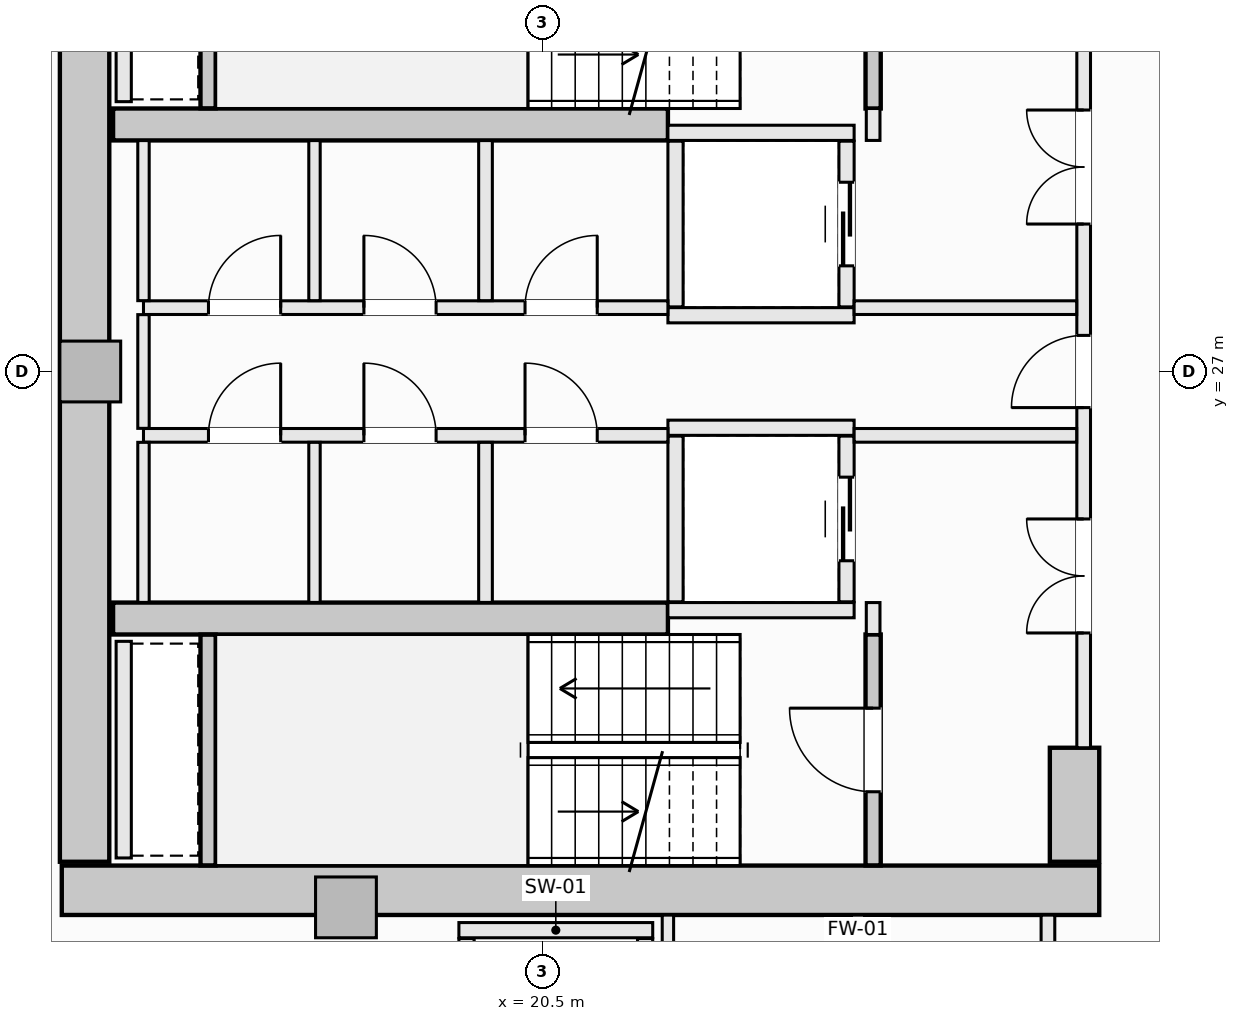
"""IFC4 building model, lengths in metres.
Left out: names, types, materials, properties, quantities, classifications, styles, units other than length and angle.
Written with IfcOpenShell. Run it as: python <this file> out.ifc"""

import sys

from ifc_helpers import new_model, si_unit, direction, frame, frame_2d, origin, origin_2d, place, context, subcontext, project, spatial, rectangle, extrude, element, fill, save


model = new_model("IFC4")
c1 = context("Model", 3, precision=1e-05, world=origin(), true_north=direction((0.0, 1.0)))
c2 = subcontext(c1, "Body", "Model", "MODEL_VIEW")
j1 = project(units=[si_unit("LENGTHUNIT", "METRE"), si_unit("PLANEANGLEUNIT", "RADIAN")], contexts=[c1])
p1 = place(None, origin())
s1 = spatial("IfcSite", under=j1, at=p1, CompositionType="ELEMENT")
p2 = place(p1, origin())
s2 = spatial("IfcBuilding", under=s1, at=p2, CompositionType="ELEMENT")
p3 = place(p2, frame((0.0, 0.0, 169.9)))
s3 = spatial("IfcBuildingStorey", under=s2, at=p3, CompositionType="ELEMENT", Elevation=169.9)
p4 = place(p3, frame((14.175, 20.175, -0.27), z_axis=(0.0, 0.0, 1.0), x_axis=(1.0, 0.0, 0.0)))
e1 = element("IfcWall", 1, at=p4, inside=s3, PredefinedType="SHEAR", context=c2, shape_type="SweptSolid", body=[
    extrude(rectangle(XDim=13.65, YDim=0.65, at=frame_2d((6.825, 0.0))), origin(), (0.0, 0.0, 1.0), 3.4),
])
p5 = place(p3, frame((14.475, 20.55, -0.27), z_axis=(0.0, 0.0, 1.0), x_axis=(0.0, 1.0, 0.0)))
e2 = element("IfcWall", 2, at=p5, inside=s3, PredefinedType="SHEAR", context=c2, shape_type="SweptSolid", body=[
    extrude(rectangle(XDim=12.9, YDim=0.65, at=frame_2d((6.45, 0.0))), origin(), (0.0, 0.0, 1.0), 3.4),
])
p6 = place(p3, frame((27.5, 20.55, -0.27), z_axis=(0.0, 0.0, 1.0), x_axis=(0.0, 1.0, 0.0)))
e3 = element("IfcWall", 3, at=p6, inside=s3, PredefinedType="SHEAR", context=c2, shape_type="SweptSolid", body=[
    extrude(rectangle(XDim=1.5, YDim=0.65, at=frame_2d((0.75, 0.0))), origin(), (0.0, 0.0, 1.0), 3.4),
])
for number, where, z_axis, x_axis in (
    (4, (14.85, 30.25, -0.27), (0.0, 0.0, 1.0), (1.0, 0.0, 0.0)),
    (5, (14.85, 23.75, -0.27), (0.0, 0.0, 1.0), (1.0, 0.0, 0.0)),
):
    element("IfcWall", number, at=place(p3, frame(where, z_axis=z_axis, x_axis=x_axis)), inside=s3, PredefinedType="SHEAR", context=c2, shape_type="SweptSolid", body=[
        extrude(rectangle(XDim=7.3, YDim=0.42, at=frame_2d((3.65, 0.0))), origin(), (0.0, 0.0, 1.0), 3.4),
    ])
for number, where, z_axis, x_axis in (
    (6, (14.55, 27.0, -0.27), (0.0, 0.0, 1.0), (1.0, 0.0, 0.0)),
    (7, (17.914, 19.95, -0.27), (0.0, 0.0, 1.0), (1.0, 0.0, 0.0)),
):
    element("IfcColumn", number, at=place(p3, frame(where, z_axis=z_axis, x_axis=x_axis)), inside=s3, PredefinedType="PILASTER", context=c2, shape_type="SweptSolid", body=[
        extrude(rectangle(XDim=0.8, YDim=0.8, at=origin_2d()), origin(), (0.0, 0.0, 1.0), 3.4),
    ])
p7 = place(p3, frame((24.85, 30.46, -0.27), z_axis=(0.0, 0.0, 1.0), x_axis=(0.0, 1.0, 0.0)))
e8 = element("IfcWall", 8, at=p7, inside=s3, PredefinedType="SHEAR", context=c2, shape_type="SweptSolid", body=[
    extrude(rectangle(XDim=3.038, YDim=0.2, at=frame_2d((1.519, 0.0))), origin(), (0.0, 0.0, 1.0), 3.4),
])
p8 = place(p7, frame((0.969, 0.0, 0.27)))
e9 = element("IfcOpeningElement", 9, at=p8, cuts=e8, PredefinedType="OPENING", context=c2, shape_type="SweptSolid", body=[
    extrude(rectangle(XDim=1.1, YDim=2.15, at=frame_2d((0.55, 1.075))), frame((0.0, 0.11, 0.0), z_axis=(0.0, -1.0, 0.0), x_axis=(1.0, 0.0, 0.0)), (0.0, 0.0, 1.0), 0.22),
])
p9 = place(p3, frame((16.1, 30.462, -0.27), z_axis=(0.0, 0.0, 1.0), x_axis=(0.0, 1.0, 0.0)))
e10 = element("IfcWall", 10, at=p9, inside=s3, PredefinedType="SHEAR", context=c2, shape_type="SweptSolid", body=[
    extrude(rectangle(XDim=3.036, YDim=0.2, at=frame_2d((1.518, 0.0))), origin(), (0.0, 0.0, 1.0), 3.4),
])
p10 = place(p3, frame((24.85, 20.502, -0.27), z_axis=(0.0, 0.0, 1.0), x_axis=(0.0, 1.0, 0.0)))
e11 = element("IfcWall", 11, at=p10, inside=s3, PredefinedType="SHEAR", context=c2, shape_type="SweptSolid", body=[
    extrude(rectangle(XDim=3.038, YDim=0.2, at=frame_2d((1.519, 0.0))), origin(), (0.0, 0.0, 1.0), 3.4),
])
p11 = place(p10, frame((0.969, 0.0, 0.27)))
e12 = element("IfcOpeningElement", 12, at=p11, cuts=e11, PredefinedType="OPENING", context=c2, shape_type="SweptSolid", body=[
    extrude(rectangle(XDim=1.1, YDim=2.15, at=frame_2d((0.55, 1.075))), frame((0.0, 0.11, 0.0), z_axis=(0.0, -1.0, 0.0), x_axis=(1.0, 0.0, 0.0)), (0.0, 0.0, 1.0), 0.22),
])
p12 = place(p3, frame((16.1, 20.502, -0.27), z_axis=(0.0, 0.0, 1.0), x_axis=(0.0, 1.0, 0.0)))
e13 = element("IfcWall", 13, at=p12, inside=s3, PredefinedType="SHEAR", context=c2, shape_type="SweptSolid", body=[
    extrude(rectangle(XDim=3.036, YDim=0.2, at=frame_2d((1.518, 0.0))), origin(), (0.0, 0.0, 1.0), 3.4),
])
for number, where, z_axis, x_axis in (
    (14, (22.15, 30.14, 0.0), (0.0, 0.0, 1.0), (1.0, 0.0, 0.0)),
    (15, (22.15, 27.74, 0.0), (0.0, 0.0, 1.0), (1.0, 0.0, 0.0)),
):
    element("IfcWall", number, at=place(p3, frame(where, z_axis=z_axis, x_axis=x_axis)), inside=s3, PredefinedType="SOLIDWALL", context=c2, shape_type="SweptSolid", body=[
        extrude(rectangle(XDim=2.45, YDim=0.2, at=frame_2d((1.225, 0.0))), origin(), (0.0, 0.0, 1.0), 3.13),
    ])
p13 = place(p3, frame((22.25, 27.85, 0.0), z_axis=(0.0, 0.0, 1.0), x_axis=(0.0, 1.0, 0.0)))
e16 = element("IfcWall", 16, at=p13, inside=s3, PredefinedType="SOLIDWALL", context=c2, shape_type="SweptSolid", body=[
    extrude(rectangle(XDim=2.18, YDim=0.2, at=frame_2d((1.09, 0.0))), origin(), (0.0, 0.0, 1.0), 3.13),
])
p14 = place(p3, frame((24.5, 27.85, 0.0), z_axis=(0.0, 0.0, 1.0), x_axis=(0.0, 1.0, 0.0)))
e17 = element("IfcWall", 17, at=p14, inside=s3, PredefinedType="SOLIDWALL", context=c2, shape_type="SweptSolid", body=[
    extrude(rectangle(XDim=2.18, YDim=0.2, at=frame_2d((1.09, 0.0))), origin(), (0.0, 0.0, 1.0), 3.13),
])
p15 = place(p14, frame((0.54, 0.0, 0.0)))
e18 = element("IfcOpeningElement", 18, at=p15, cuts=e17, PredefinedType="OPENING", context=c2, shape_type="SweptSolid", body=[
    extrude(rectangle(XDim=1.1, YDim=2.2, at=frame_2d((0.55, 1.1))), frame((0.0, 0.11, 0.0), z_axis=(0.0, -1.0, 0.0), x_axis=(1.0, 0.0, 0.0)), (0.0, 0.0, 1.0), 0.22),
])
for number, where, z_axis, x_axis in (
    (19, (22.15, 26.26, 0.0), (0.0, 0.0, 1.0), (1.0, 0.0, 0.0)),
    (20, (22.15, 23.86, 0.0), (0.0, 0.0, 1.0), (1.0, 0.0, 0.0)),
):
    element("IfcWall", number, at=place(p3, frame(where, z_axis=z_axis, x_axis=x_axis)), inside=s3, PredefinedType="SOLIDWALL", context=c2, shape_type="SweptSolid", body=[
        extrude(rectangle(XDim=2.45, YDim=0.2, at=frame_2d((1.225, 0.0))), origin(), (0.0, 0.0, 1.0), 3.13),
    ])
p16 = place(p3, frame((22.25, 23.97, 0.0), z_axis=(0.0, 0.0, 1.0), x_axis=(0.0, 1.0, 0.0)))
e21 = element("IfcWall", 21, at=p16, inside=s3, PredefinedType="SOLIDWALL", context=c2, shape_type="SweptSolid", body=[
    extrude(rectangle(XDim=2.18, YDim=0.2, at=frame_2d((1.09, 0.0))), origin(), (0.0, 0.0, 1.0), 3.13),
])
p17 = place(p3, frame((24.5, 23.97, 0.0), z_axis=(0.0, 0.0, 1.0), x_axis=(0.0, 1.0, 0.0)))
e22 = element("IfcWall", 22, at=p17, inside=s3, PredefinedType="SOLIDWALL", context=c2, shape_type="SweptSolid", body=[
    extrude(rectangle(XDim=2.18, YDim=0.2, at=frame_2d((1.09, 0.0))), origin(), (0.0, 0.0, 1.0), 3.13),
])
p18 = place(p17, frame((0.54, 0.0, 0.0)))
e23 = element("IfcOpeningElement", 23, at=p18, cuts=e22, PredefinedType="OPENING", context=c2, shape_type="SweptSolid", body=[
    extrude(rectangle(XDim=1.1, YDim=2.2, at=frame_2d((0.55, 1.1))), frame((0.0, 0.11, 0.0), z_axis=(0.0, -1.0, 0.0), x_axis=(1.0, 0.0, 0.0)), (0.0, 0.0, 1.0), 0.22),
])
p19 = place(p3, frame((19.4, 19.65, 0.0), z_axis=(0.0, 0.0, 1.0), x_axis=(1.0, 0.0, 0.0)))
e24 = element("IfcWall", 24, at=p19, inside=s3, PredefinedType="SOLIDWALL", context=c2, shape_type="SweptSolid", body=[
    extrude(rectangle(XDim=2.55, YDim=0.2, at=frame_2d((1.275, 0.0))), origin(), (0.0, 0.0, 1.0), 3.13),
])
for number, where, z_axis, x_axis in (
    (25, (19.5, 17.01, 0.0), (0.0, 0.0, 1.0), (0.0, 1.0, 0.0)),
    (26, (21.85, 17.01, 0.0), (0.0, 0.0, 1.0), (0.0, 1.0, 0.0)),
):
    element("IfcWall", number, at=place(p3, frame(where, z_axis=z_axis, x_axis=x_axis)), inside=s3, PredefinedType="SOLIDWALL", context=c2, shape_type="SweptSolid", body=[
        extrude(rectangle(XDim=2.53, YDim=0.2, at=frame_2d((1.265, 0.0))), origin(), (0.0, 0.0, 1.0), 3.13),
    ])
for number, where, z_axis, x_axis in (
    (27, (14.99, 30.55, 0.0), (0.0, 0.0, 1.0), (0.0, 1.0, 0.0)),
    (28, (14.99, 20.6, 0.0), (0.0, 0.0, 1.0), (0.0, 1.0, 0.0)),
):
    element("IfcWall", number, at=place(p3, frame(where, z_axis=z_axis, x_axis=x_axis)), inside=s3, PredefinedType="SOLIDWALL", context=c2, shape_type="SweptSolid", body=[
        extrude(rectangle(XDim=2.85, YDim=0.2, at=frame_2d((1.425, 0.0))), origin(), (0.0, 0.0, 1.0), 3.13),
    ])
for number, where, z_axis, x_axis in (
    (29, (24.85, 23.54, 0.0), (0.0, 0.0, 1.0), (0.0, 1.0, 0.0)),
    (30, (24.85, 30.04, 0.0), (0.0, 0.0, 1.0), (0.0, 1.0, 0.0)),
):
    element("IfcWall", number, at=place(p3, frame(where, z_axis=z_axis, x_axis=x_axis)), inside=s3, PredefinedType="SOLIDWALL", context=c2, shape_type="SweptSolid", body=[
        extrude(rectangle(XDim=0.42, YDim=0.18, at=frame_2d((0.21, 0.0))), origin(), (0.0, 0.0, 1.0), 3.13),
    ])
p20 = place(p3, frame((27.62, 22.05, 0.0), z_axis=(0.0, 0.0, 1.0), x_axis=(0.0, 1.0, 0.0)))
e31 = element("IfcWall", 31, at=p20, inside=s3, PredefinedType="SOLIDWALL", context=c2, shape_type="SweptSolid", body=[
    extrude(rectangle(XDim=9.9, YDim=0.18, at=frame_2d((4.95, 0.0))), origin(), (0.0, 0.0, 1.0), 3.13),
])
p21 = place(p20, frame((4.475, 0.0, 0.0)))
e32 = element("IfcOpeningElement", 32, at=p21, cuts=e31, PredefinedType="OPENING", context=c2, shape_type="SweptSolid", body=[
    extrude(rectangle(XDim=0.95, YDim=2.1, at=frame_2d((0.475, 1.05))), frame((0.0, 0.1, 0.0), z_axis=(0.0, -1.0, 0.0), x_axis=(1.0, 0.0, 0.0)), (0.0, 0.0, 1.0), 0.2),
])
p22 = place(p20, frame((6.89, 0.0, 0.0)))
e33 = element("IfcOpeningElement", 33, at=p22, cuts=e31, PredefinedType="OPENING", context=c2, shape_type="SweptSolid", body=[
    extrude(rectangle(XDim=1.5, YDim=2.2, at=frame_2d((0.75, 1.1))), frame((0.0, 0.1, 0.0), z_axis=(0.0, -1.0, 0.0), x_axis=(1.0, 0.0, 0.0)), (0.0, 0.0, 1.0), 0.2),
])
p23 = place(p20, frame((1.51, 0.0, 0.0)))
e34 = element("IfcOpeningElement", 34, at=p23, cuts=e31, PredefinedType="OPENING", context=c2, shape_type="SweptSolid", body=[
    extrude(rectangle(XDim=1.5, YDim=2.2, at=frame_2d((0.75, 1.1))), frame((0.0, 0.1, 0.0), z_axis=(0.0, -1.0, 0.0), x_axis=(1.0, 0.0, 0.0)), (0.0, 0.0, 1.0), 0.2),
])
p24 = place(p3, frame((15.25, 27.84, 0.0), z_axis=(0.0, 0.0, 1.0), x_axis=(1.0, 0.0, 0.0)))
e35 = element("IfcWall", 35, at=p24, inside=s3, PredefinedType="SOLIDWALL", context=c2, shape_type="SweptSolid", body=[
    extrude(rectangle(XDim=6.9, YDim=0.18, at=frame_2d((3.45, 0.0))), origin(), (0.0, 0.0, 1.0), 3.13),
])
p25 = place(p24, frame((5.02, 0.0, 0.0)))
e36 = element("IfcOpeningElement", 36, at=p25, cuts=e35, PredefinedType="OPENING", context=c2, shape_type="SweptSolid", body=[
    extrude(rectangle(XDim=0.95, YDim=2.1, at=frame_2d((0.475, 1.05))), frame((0.0, 0.1, 0.0), z_axis=(0.0, -1.0, 0.0), x_axis=(1.0, 0.0, 0.0)), (0.0, 0.0, 1.0), 0.2),
])
p26 = place(p24, frame((0.855, 0.0, 0.0)))
e37 = element("IfcOpeningElement", 37, at=p26, cuts=e35, PredefinedType="OPENING", context=c2, shape_type="SweptSolid", body=[
    extrude(rectangle(XDim=0.95, YDim=2.1, at=frame_2d((0.475, 1.05))), frame((0.0, 0.1, 0.0), z_axis=(0.0, -1.0, 0.0), x_axis=(1.0, 0.0, 0.0)), (0.0, 0.0, 1.0), 0.2),
])
p27 = place(p24, frame((2.9, 0.0, 0.0)))
e38 = element("IfcOpeningElement", 38, at=p27, cuts=e35, PredefinedType="OPENING", context=c2, shape_type="SweptSolid", body=[
    extrude(rectangle(XDim=0.95, YDim=2.1, at=frame_2d((0.475, 1.05))), frame((0.0, 0.1, 0.0), z_axis=(0.0, -1.0, 0.0), x_axis=(1.0, 0.0, 0.0)), (0.0, 0.0, 1.0), 0.2),
])
p28 = place(p3, frame((24.6, 27.84, 0.0), z_axis=(0.0, 0.0, 1.0), x_axis=(1.0, 0.0, 0.0)))
e39 = element("IfcWall", 39, at=p28, inside=s3, PredefinedType="SOLIDWALL", context=c2, shape_type="SweptSolid", body=[
    extrude(rectangle(XDim=2.928, YDim=0.18, at=frame_2d((1.464, 0.0))), origin(), (0.0, 0.0, 1.0), 3.13),
])
p29 = place(p3, frame((15.25, 26.16, 0.0), z_axis=(0.0, 0.0, 1.0), x_axis=(1.0, 0.0, 0.0)))
e40 = element("IfcWall", 40, at=p29, inside=s3, PredefinedType="SOLIDWALL", context=c2, shape_type="SweptSolid", body=[
    extrude(rectangle(XDim=6.9, YDim=0.18, at=frame_2d((3.45, 0.0))), origin(), (0.0, 0.0, 1.0), 3.13),
])
p30 = place(p29, frame((5.02, 0.0, 0.0)))
e41 = element("IfcOpeningElement", 41, at=p30, cuts=e40, PredefinedType="OPENING", context=c2, shape_type="SweptSolid", body=[
    extrude(rectangle(XDim=0.95, YDim=2.1, at=frame_2d((0.475, 1.05))), frame((0.0, 0.1, 0.0), z_axis=(0.0, -1.0, 0.0), x_axis=(1.0, 0.0, 0.0)), (0.0, 0.0, 1.0), 0.2),
])
p31 = place(p29, frame((0.855, 0.0, 0.0)))
e42 = element("IfcOpeningElement", 42, at=p31, cuts=e40, PredefinedType="OPENING", context=c2, shape_type="SweptSolid", body=[
    extrude(rectangle(XDim=0.95, YDim=2.1, at=frame_2d((0.475, 1.05))), frame((0.0, 0.1, 0.0), z_axis=(0.0, -1.0, 0.0), x_axis=(1.0, 0.0, 0.0)), (0.0, 0.0, 1.0), 0.2),
])
p32 = place(p29, frame((2.9, 0.0, 0.0)))
e43 = element("IfcOpeningElement", 43, at=p32, cuts=e40, PredefinedType="OPENING", context=c2, shape_type="SweptSolid", body=[
    extrude(rectangle(XDim=0.95, YDim=2.1, at=frame_2d((0.475, 1.05))), frame((0.0, 0.1, 0.0), z_axis=(0.0, -1.0, 0.0), x_axis=(1.0, 0.0, 0.0)), (0.0, 0.0, 1.0), 0.2),
])
p33 = place(p3, frame((24.6, 26.16, 0.0), z_axis=(0.0, 0.0, 1.0), x_axis=(1.0, 0.0, 0.0)))
e44 = element("IfcWall", 44, at=p33, inside=s3, PredefinedType="SOLIDWALL", context=c2, shape_type="SweptSolid", body=[
    extrude(rectangle(XDim=2.928, YDim=0.18, at=frame_2d((1.464, 0.0))), origin(), (0.0, 0.0, 1.0), 3.13),
])
p34 = place(p3, frame((15.25, 23.962, 0.0), z_axis=(0.0, 0.0, 1.0), x_axis=(0.0, 1.0, 0.0)))
e45 = element("IfcWall", 45, at=p34, inside=s3, PredefinedType="PARTITIONING", context=c2, shape_type="SweptSolid", body=[
    extrude(rectangle(XDim=2.106, YDim=0.15, at=frame_2d((1.053, 0.0))), origin(), (0.0, 0.0, 1.0), 3.13),
])
p35 = place(p3, frame((15.25, 26.252, 0.0), z_axis=(0.0, 0.0, 1.0), x_axis=(0.0, 1.0, 0.0)))
e46 = element("IfcWall", 46, at=p35, inside=s3, PredefinedType="PARTITIONING", context=c2, shape_type="SweptSolid", body=[
    extrude(rectangle(XDim=1.496, YDim=0.15, at=frame_2d((0.748, 0.0))), origin(), (0.0, 0.0, 1.0), 3.13),
])
p36 = place(p3, frame((15.25, 27.932, 0.0), z_axis=(0.0, 0.0, 1.0), x_axis=(0.0, 1.0, 0.0)))
e47 = element("IfcWall", 47, at=p36, inside=s3, PredefinedType="PARTITIONING", context=c2, shape_type="SweptSolid", body=[
    extrude(rectangle(XDim=2.106, YDim=0.15, at=frame_2d((1.053, 0.0))), origin(), (0.0, 0.0, 1.0), 3.13),
])
for number, where, z_axis, x_axis in (
    (48, (19.75, 23.962, 0.0), (0.0, 0.0, 1.0), (0.0, 1.0, 0.0)),
    (49, (19.75, 27.932, 0.0), (0.0, 0.0, 1.0), (0.0, 1.0, 0.0)),
):
    element("IfcWall", number, at=place(p3, frame(where, z_axis=z_axis, x_axis=x_axis)), inside=s3, PredefinedType="SOLIDWALL", context=c2, shape_type="SweptSolid", body=[
        extrude(rectangle(XDim=2.106, YDim=0.18, at=frame_2d((1.053, 0.0))), origin(), (0.0, 0.0, 1.0), 3.13),
    ])
for number, where, z_axis, x_axis in (
    (50, (17.5, 23.962, 0.0), (0.0, 0.0, 1.0), (0.0, 1.0, 0.0)),
    (51, (17.5, 27.932, 0.0), (0.0, 0.0, 1.0), (0.0, 1.0, 0.0)),
):
    element("IfcWall", number, at=place(p3, frame(where, z_axis=z_axis, x_axis=x_axis)), inside=s3, PredefinedType="PARTITIONING", context=c2, shape_type="SweptSolid", body=[
        extrude(rectangle(XDim=2.106, YDim=0.15, at=frame_2d((1.053, 0.0))), origin(), (0.0, 0.0, 1.0), 3.13),
    ])
p37 = place(p3, frame((22.15, 17.142, 0.0), z_axis=(0.0, 0.0, 1.0), x_axis=(0.0, 1.0, 0.0)))
e52 = element("IfcWall", 52, at=p37, inside=s3, PredefinedType="PARTITIONING", context=c2, shape_type="SweptSolid", body=[
    extrude(rectangle(XDim=2.706, YDim=0.15, at=frame_2d((1.353, 0.0))), origin(), (0.0, 0.0, 1.0), 3.13),
])
for number, where, z_axis, x_axis in (
    (53, (24.65, 17.142, 0.0), (0.0, 0.0, 1.0), (0.0, 1.0, 0.0)),
    (54, (27.15, 17.142, 0.0), (0.0, 0.0, 1.0), (0.0, 1.0, 0.0)),
):
    element("IfcWall", number, at=place(p3, frame(where, z_axis=z_axis, x_axis=x_axis)), inside=s3, PredefinedType="SOLIDWALL", context=c2, shape_type="SweptSolid", body=[
        extrude(rectangle(XDim=2.706, YDim=0.18, at=frame_2d((1.353, 0.0))), origin(), (0.0, 0.0, 1.0), 3.13),
    ])
p38 = place(p11, origin())
e55 = element("IfcDoor", 55, at=p38, inside=s3, OperationType="SINGLE_SWING_RIGHT", PredefinedType="DOOR", context=c2, shape_type="SweptSolid", body=[
    extrude(rectangle(XDim=1.1, YDim=2.15, at=frame_2d((0.55, 1.075))), frame((0.0, 0.025, 0.0), z_axis=(0.0, -1.0, 0.0), x_axis=(1.0, 0.0, 0.0)), (0.0, 0.0, 1.0), 0.05),
])
fill(e12, e55)
p39 = place(p15, origin())
e56 = element("IfcDoor", 56, at=p39, inside=s3, OperationType="SLIDING_TO_LEFT", PredefinedType="DOOR", context=c2, shape_type="SweptSolid", body=[
    extrude(rectangle(XDim=1.1, YDim=2.2, at=frame_2d((0.55, 1.1))), frame((0.0, 0.025, 0.0), z_axis=(0.0, -1.0, 0.0), x_axis=(1.0, 0.0, 0.0)), (0.0, 0.0, 1.0), 0.05),
])
fill(e18, e56)
p40 = place(p18, origin())
e57 = element("IfcDoor", 57, at=p40, inside=s3, OperationType="SLIDING_TO_LEFT", PredefinedType="DOOR", context=c2, shape_type="SweptSolid", body=[
    extrude(rectangle(XDim=1.1, YDim=2.2, at=frame_2d((0.55, 1.1))), frame((0.0, 0.025, 0.0), z_axis=(0.0, -1.0, 0.0), x_axis=(1.0, 0.0, 0.0)), (0.0, 0.0, 1.0), 0.05),
])
fill(e23, e57)
p41 = place(p21, origin())
e58 = element("IfcDoor", 58, at=p41, inside=s3, OperationType="SINGLE_SWING_LEFT", PredefinedType="DOOR", context=c2, shape_type="SweptSolid", body=[
    extrude(rectangle(XDim=0.95, YDim=2.1, at=frame_2d((0.475, 1.05))), frame((0.0, 0.025, 0.0), z_axis=(0.0, -1.0, 0.0), x_axis=(1.0, 0.0, 0.0)), (0.0, 0.0, 1.0), 0.05),
])
fill(e32, e58)
p42 = place(p22, origin())
e59 = element("IfcDoor", 59, at=p42, inside=s3, OperationType="DOUBLE_DOOR_SINGLE_SWING", PredefinedType="DOOR", context=c2, shape_type="SweptSolid", body=[
    extrude(rectangle(XDim=1.5, YDim=2.2, at=frame_2d((0.75, 1.1))), frame((0.0, 0.025, 0.0), z_axis=(0.0, -1.0, 0.0), x_axis=(1.0, 0.0, 0.0)), (0.0, 0.0, 1.0), 0.05),
])
fill(e33, e59)
p43 = place(p23, origin())
e60 = element("IfcDoor", 60, at=p43, inside=s3, OperationType="DOUBLE_DOOR_SINGLE_SWING", PredefinedType="DOOR", context=c2, shape_type="SweptSolid", body=[
    extrude(rectangle(XDim=1.5, YDim=2.2, at=frame_2d((0.75, 1.1))), frame((0.0, 0.025, 0.0), z_axis=(0.0, -1.0, 0.0), x_axis=(1.0, 0.0, 0.0)), (0.0, 0.0, 1.0), 0.05),
])
fill(e34, e60)
p44 = place(p25, origin())
e61 = element("IfcDoor", 61, at=p44, inside=s3, OperationType="SINGLE_SWING_RIGHT", PredefinedType="DOOR", context=c2, shape_type="SweptSolid", body=[
    extrude(rectangle(XDim=0.95, YDim=2.1, at=frame_2d((0.475, 1.05))), frame((0.0, 0.025, 0.0), z_axis=(0.0, -1.0, 0.0), x_axis=(1.0, 0.0, 0.0)), (0.0, 0.0, 1.0), 0.05),
])
fill(e36, e61)
p45 = place(p30, origin())
e62 = element("IfcDoor", 62, at=p45, inside=s3, OperationType="SINGLE_SWING_LEFT", PredefinedType="DOOR", context=c2, shape_type="SweptSolid", body=[
    extrude(rectangle(XDim=0.95, YDim=2.1, at=frame_2d((0.475, 1.05))), frame((0.0, 0.025, 0.0), z_axis=(0.0, -1.0, 0.0), x_axis=(1.0, 0.0, 0.0)), (0.0, 0.0, 1.0), 0.05),
])
fill(e41, e62)
p46 = place(p26, origin())
e63 = element("IfcDoor", 63, at=p46, inside=s3, OperationType="SINGLE_SWING_RIGHT", PredefinedType="DOOR", context=c2, shape_type="SweptSolid", body=[
    extrude(rectangle(XDim=0.95, YDim=2.1, at=frame_2d((0.475, 1.05))), frame((0.0, 0.025, 0.0), z_axis=(0.0, -1.0, 0.0), x_axis=(1.0, 0.0, 0.0)), (0.0, 0.0, 1.0), 0.05),
])
fill(e37, e63)
p47 = place(p27, origin())
e64 = element("IfcDoor", 64, at=p47, inside=s3, OperationType="SINGLE_SWING_LEFT", PredefinedType="DOOR", context=c2, shape_type="SweptSolid", body=[
    extrude(rectangle(XDim=0.95, YDim=2.1, at=frame_2d((0.475, 1.05))), frame((0.0, 0.025, 0.0), z_axis=(0.0, -1.0, 0.0), x_axis=(1.0, 0.0, 0.0)), (0.0, 0.0, 1.0), 0.05),
])
fill(e38, e64)
p48 = place(p31, origin())
e65 = element("IfcDoor", 65, at=p48, inside=s3, OperationType="SINGLE_SWING_RIGHT", PredefinedType="DOOR", context=c2, shape_type="SweptSolid", body=[
    extrude(rectangle(XDim=0.95, YDim=2.1, at=frame_2d((0.475, 1.05))), frame((0.0, 0.025, 0.0), z_axis=(0.0, -1.0, 0.0), x_axis=(1.0, 0.0, 0.0)), (0.0, 0.0, 1.0), 0.05),
])
fill(e42, e65)
p49 = place(p32, origin())
e66 = element("IfcDoor", 66, at=p49, inside=s3, OperationType="SINGLE_SWING_LEFT", PredefinedType="DOOR", context=c2, shape_type="SweptSolid", body=[
    extrude(rectangle(XDim=0.95, YDim=2.1, at=frame_2d((0.475, 1.05))), frame((0.0, 0.025, 0.0), z_axis=(0.0, -1.0, 0.0), x_axis=(1.0, 0.0, 0.0)), (0.0, 0.0, 1.0), 0.05),
])
fill(e43, e66)
save(model, sys.argv[1])
